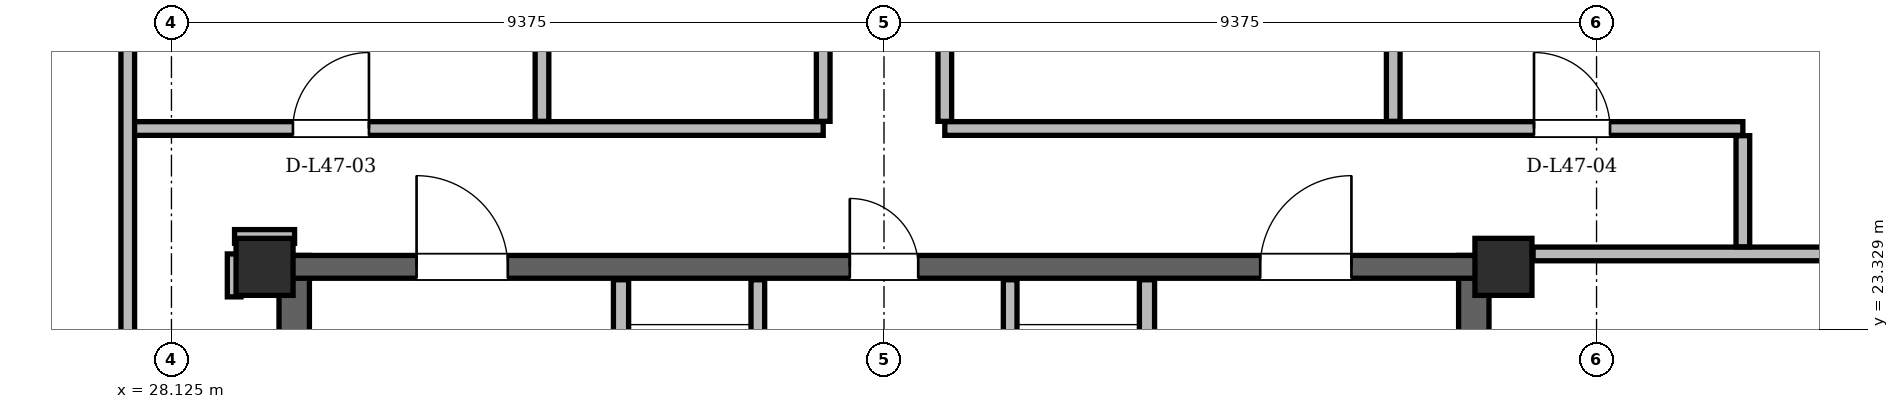
"""IFC4 building model, lengths in metres.
Left out: names, types, materials, properties, quantities, classifications, styles, units other than length and angle.
Written with IfcOpenShell. Run it as: python <this file> out.ifc"""

import sys

from ifc_helpers import new_model, si_unit, direction, frame, frame_2d, origin, origin_2d, place, context, subcontext, project, spatial, rectangle, hollow_rectangle, extrude, element, fill, save


model = new_model("IFC4")
c1 = context("Model", 3, precision=1e-05, world=origin(), true_north=direction((0.0, 1.0)))
c2 = subcontext(c1, "Body", "Model", "MODEL_VIEW")
j1 = project(units=[si_unit("LENGTHUNIT", "METRE"), si_unit("PLANEANGLEUNIT", "RADIAN")], contexts=[c1])
p1 = place(None, origin())
s1 = spatial("IfcSite", under=j1, at=p1, CompositionType="ELEMENT")
p2 = place(p1, origin())
s2 = spatial("IfcBuilding", under=s1, at=p2, CompositionType="ELEMENT")
p3 = place(p2, frame((0.0, 0.0, 178.2)))
s3 = spatial("IfcBuildingStorey", under=s2, at=p3, CompositionType="ELEMENT", Elevation=178.2)
for number, where, z_axis, x_axis in (
    (1, (45.65, 24.15, 0.0), (0.0, 0.0, 1.0), (1.0, 0.0, 0.0)),
    (2, (29.35, 24.15, 0.0), (0.0, 0.0, 1.0), (1.0, 0.0, 0.0)),
):
    element("IfcColumn", number, at=place(p3, frame(where, z_axis=z_axis, x_axis=x_axis)), inside=s3, PredefinedType="COLUMN", context=c2, shape_type="SweptSolid", body=[
        extrude(hollow_rectangle(XDim=0.75, YDim=0.75, WallThickness=0.06, at=origin_2d()), origin(), (0.0, 0.0, 1.0), 3.6),
    ])
for number, where, z_axis, x_axis in (
    (3, (29.74, 11.0, 0.0), (0.0, 0.0, 1.0), (0.0, 1.0, 0.0)),
    (4, (45.26, 11.0, 0.0), (0.0, 0.0, 1.0), (0.0, 1.0, 0.0)),
):
    element("IfcWall", number, at=place(p3, frame(where, z_axis=z_axis, x_axis=x_axis)), inside=s3, PredefinedType="SHEAR", context=c2, shape_type="SweptSolid", body=[
        extrude(rectangle(XDim=13.3, YDim=0.4, at=frame_2d((6.65, 0.0))), origin(), (0.0, 0.0, 1.0), 3.38),
    ])
p4 = place(p3, frame((29.65, 24.15, 0.0), z_axis=(0.0, 0.0, 1.0), x_axis=(1.0, 0.0, 0.0)))
e5 = element("IfcWall", 5, at=p4, inside=s3, PredefinedType="SHEAR", context=c2, shape_type="SweptSolid", body=[
    extrude(rectangle(XDim=15.7, YDim=0.3, at=frame_2d((7.85, 0.0))), origin(), (0.0, 0.0, 1.0), 3.38),
])
p5 = place(p4, frame((1.7, 0.0, 0.0)))
e6 = element("IfcOpeningElement", 6, at=p5, cuts=e5, PredefinedType="OPENING", context=c2, shape_type="SweptSolid", body=[
    extrude(rectangle(XDim=1.2, YDim=2.2, at=frame_2d((0.6, 1.1))), frame((0.0, 0.15, 0.0), z_axis=(0.0, -1.0, 0.0), x_axis=(1.0, 0.0, 0.0)), (0.0, 0.0, 1.0), 0.3),
])
p6 = place(p4, frame((12.8, 0.0, 0.0)))
e7 = element("IfcOpeningElement", 7, at=p6, cuts=e5, PredefinedType="OPENING", context=c2, shape_type="SweptSolid", body=[
    extrude(rectangle(XDim=1.2, YDim=2.2, at=frame_2d((0.6, 1.1))), frame((0.0, 0.15, 0.0), z_axis=(0.0, -1.0, 0.0), x_axis=(1.0, 0.0, 0.0)), (0.0, 0.0, 1.0), 0.3),
])
p7 = place(p4, frame((7.4, 0.0, 0.0)))
e8 = element("IfcOpeningElement", 8, at=p7, cuts=e5, PredefinedType="OPENING", context=c2, shape_type="SweptSolid", body=[
    extrude(rectangle(XDim=0.9, YDim=2.05, at=frame_2d((0.45, 1.025))), frame((0.0, 0.15, 0.0), z_axis=(0.0, -1.0, 0.0), x_axis=(1.0, 0.0, 0.0)), (0.0, 0.0, 1.0), 0.3),
])
p8 = place(p3, frame((59.612, 12.087, 0.0), z_axis=(0.0, 0.0, 1.0), x_axis=(-0.499997641637, 0.866026765382, 0.0)))
e9 = element("IfcWall", 9, at=p8, inside=s3, PredefinedType="SOLIDWALL", context=c2, shape_type="SweptSolid", body=[
    extrude(rectangle(XDim=35.992, YDim=0.29, at=frame_2d((17.996, 0.0))), origin(), (0.0, 0.0, 1.0), 2.6),
])
p9 = place(p8, frame((8.034, 0.0, 0.0)))
e10 = element("IfcOpeningElement", 10, at=p9, cuts=e9, PredefinedType="OPENING", context=c2, shape_type="SweptSolid", body=[
    extrude(rectangle(XDim=1.5, YDim=2.2, at=frame_2d((0.75, 1.1))), frame((0.0, 0.145, 0.0), z_axis=(0.0, -1.0, 0.0), x_axis=(1.0, 0.0, 0.0)), (0.0, 0.0, 1.0), 0.29),
])
p10 = place(p8, frame((31.062, 0.0, 0.0)))
e11 = element("IfcOpeningElement", 11, at=p10, cuts=e9, PredefinedType="OPENING", context=c2, shape_type="SweptSolid", body=[
    extrude(rectangle(XDim=1.5, YDim=2.2, at=frame_2d((0.75, 1.1))), frame((0.0, 0.145, 0.0), z_axis=(0.0, -1.0, 0.0), x_axis=(1.0, 0.0, 0.0)), (0.0, 0.0, 1.0), 0.29),
])
p11 = place(p8, frame((28.16, 0.0, 0.85)))
e12 = element("IfcOpeningElement", 12, at=p11, cuts=e9, PredefinedType="OPENING", context=c2, shape_type="SweptSolid", body=[
    extrude(rectangle(XDim=1.2, YDim=1.48, at=frame_2d((0.6, 0.74))), frame((0.0, 0.145, 0.0), z_axis=(0.0, -1.0, 0.0), x_axis=(1.0, 0.0, 0.0)), (0.0, 0.0, 1.0), 0.29),
])
p12 = place(p8, frame((33.069, 0.0, 0.85)))
e13 = element("IfcOpeningElement", 13, at=p12, cuts=e9, PredefinedType="OPENING", context=c2, shape_type="SweptSolid", body=[
    extrude(rectangle(XDim=1.2, YDim=1.48, at=frame_2d((0.6, 0.74))), frame((0.0, 0.145, 0.0), z_axis=(0.0, -1.0, 0.0), x_axis=(1.0, 0.0, 0.0)), (0.0, 0.0, 1.0), 0.29),
])
p13 = place(p8, frame((14.916, 0.0, 0.85)))
e14 = element("IfcOpeningElement", 14, at=p13, cuts=e9, PredefinedType="OPENING", context=c2, shape_type="SweptSolid", body=[
    extrude(rectangle(XDim=1.4, YDim=1.6, at=frame_2d((0.7, 0.8))), frame((0.0, 0.145, 0.0), z_axis=(0.0, -1.0, 0.0), x_axis=(1.0, 0.0, 0.0)), (0.0, 0.0, 1.0), 0.29),
])
p14 = place(p8, frame((17.971, 0.0, 0.85)))
e15 = element("IfcOpeningElement", 15, at=p14, cuts=e9, PredefinedType="OPENING", context=c2, shape_type="SweptSolid", body=[
    extrude(rectangle(XDim=1.2, YDim=1.48, at=frame_2d((0.6, 0.74))), frame((0.0, 0.145, 0.0), z_axis=(0.0, -1.0, 0.0), x_axis=(1.0, 0.0, 0.0)), (0.0, 0.0, 1.0), 0.29),
])
p15 = place(p8, frame((21.213, 0.0, 0.85)))
e16 = element("IfcOpeningElement", 16, at=p15, cuts=e9, PredefinedType="OPENING", context=c2, shape_type="SweptSolid", body=[
    extrude(rectangle(XDim=1.2, YDim=1.48, at=frame_2d((0.6, 0.74))), frame((0.0, 0.145, 0.0), z_axis=(0.0, -1.0, 0.0), x_axis=(1.0, 0.0, 0.0)), (0.0, 0.0, 1.0), 0.29),
])
p16 = place(p8, frame((26.453, 0.0, 0.85)))
e17 = element("IfcOpeningElement", 17, at=p16, cuts=e9, PredefinedType="OPENING", context=c2, shape_type="SweptSolid", body=[
    extrude(rectangle(XDim=1.2, YDim=1.48, at=frame_2d((0.6, 0.74))), frame((0.0, 0.145, 0.0), z_axis=(0.0, -1.0, 0.0), x_axis=(1.0, 0.0, 0.0)), (0.0, 0.0, 1.0), 0.29),
])
p17 = place(p3, frame((33.384, 43.257, 0.0), z_axis=(0.0, 0.0, 1.0), x_axis=(-0.499997641637, -0.866026765382, 0.0)))
e18 = element("IfcWall", 18, at=p17, inside=s3, PredefinedType="SOLIDWALL", context=c2, shape_type="SweptSolid", body=[
    extrude(rectangle(XDim=35.992, YDim=0.29, at=frame_2d((17.996, 0.0))), origin(), (0.0, 0.0, 1.0), 2.6),
])
p18 = place(p17, frame((8.034, 0.0, 0.0)))
e19 = element("IfcOpeningElement", 19, at=p18, cuts=e18, PredefinedType="OPENING", context=c2, shape_type="SweptSolid", body=[
    extrude(rectangle(XDim=1.5, YDim=2.2, at=frame_2d((0.75, 1.1))), frame((0.0, 0.145, 0.0), z_axis=(0.0, -1.0, 0.0), x_axis=(1.0, 0.0, 0.0)), (0.0, 0.0, 1.0), 0.29),
])
p19 = place(p17, frame((27.913, 0.0, 0.0)))
e20 = element("IfcOpeningElement", 20, at=p19, cuts=e18, PredefinedType="OPENING", context=c2, shape_type="SweptSolid", body=[
    extrude(rectangle(XDim=1.5, YDim=2.2, at=frame_2d((0.75, 1.1))), frame((0.0, 0.145, 0.0), z_axis=(0.0, -1.0, 0.0), x_axis=(1.0, 0.0, 0.0)), (0.0, 0.0, 1.0), 0.29),
])
p20 = place(p17, frame((33.875, 0.0, 0.85)))
e21 = element("IfcOpeningElement", 21, at=p20, cuts=e18, PredefinedType="OPENING", context=c2, shape_type="SweptSolid", body=[
    extrude(rectangle(XDim=1.2, YDim=1.48, at=frame_2d((0.6, 0.74))), frame((0.0, 0.145, 0.0), z_axis=(0.0, -1.0, 0.0), x_axis=(1.0, 0.0, 0.0)), (0.0, 0.0, 1.0), 0.29),
])
p21 = place(p17, frame((18.191, 0.0, 0.85)))
e22 = element("IfcOpeningElement", 22, at=p21, cuts=e18, PredefinedType="OPENING", context=c2, shape_type="SweptSolid", body=[
    extrude(rectangle(XDim=2.6, YDim=1.64, at=frame_2d((1.3, 0.82))), frame((0.0, 0.145, 0.0), z_axis=(0.0, -1.0, 0.0), x_axis=(1.0, 0.0, 0.0)), (0.0, 0.0, 1.0), 0.29),
])
p22 = place(p17, frame((26.178, 0.0, 0.85)))
e23 = element("IfcOpeningElement", 23, at=p22, cuts=e18, PredefinedType="OPENING", context=c2, shape_type="SweptSolid", body=[
    extrude(rectangle(XDim=1.2, YDim=1.48, at=frame_2d((0.6, 0.74))), frame((0.0, 0.145, 0.0), z_axis=(0.0, -1.0, 0.0), x_axis=(1.0, 0.0, 0.0)), (0.0, 0.0, 1.0), 0.29),
])
p23 = place(p17, frame((12.657, 0.0, 0.85)))
e24 = element("IfcOpeningElement", 24, at=p23, cuts=e18, PredefinedType="OPENING", context=c2, shape_type="SweptSolid", body=[
    extrude(rectangle(XDim=1.2, YDim=1.48, at=frame_2d((0.6, 0.74))), frame((0.0, 0.145, 0.0), z_axis=(0.0, -1.0, 0.0), x_axis=(1.0, 0.0, 0.0)), (0.0, 0.0, 1.0), 0.29),
])
p24 = place(p17, frame((14.939, 0.0, 0.85)))
e25 = element("IfcOpeningElement", 25, at=p24, cuts=e18, PredefinedType="OPENING", context=c2, shape_type="SweptSolid", body=[
    extrude(rectangle(XDim=1.8, YDim=1.64, at=frame_2d((0.9, 0.82))), frame((0.0, 0.145, 0.0), z_axis=(0.0, -1.0, 0.0), x_axis=(1.0, 0.0, 0.0)), (0.0, 0.0, 1.0), 0.29),
])
p25 = place(p17, frame((2.236, 0.0, 0.85)))
e26 = element("IfcOpeningElement", 26, at=p25, cuts=e18, PredefinedType="OPENING", context=c2, shape_type="SweptSolid", body=[
    extrude(rectangle(XDim=2.0, YDim=1.64, at=frame_2d((1.0, 0.82))), frame((0.0, 0.145, 0.0), z_axis=(0.0, -1.0, 0.0), x_axis=(1.0, 0.0, 0.0)), (0.0, 0.0, 1.0), 0.29),
])
p26 = place(p3, frame((34.04, 19.48, 0.0), z_axis=(0.0, 0.0, 1.0), x_axis=(0.0, 1.0, 0.0)))
e27 = element("IfcWall", 27, at=p26, inside=s3, PredefinedType="PARTITIONING", context=c2, shape_type="SweptSolid", body=[
    extrude(rectangle(XDim=4.5, YDim=0.2, at=frame_2d((2.25, 0.0))), origin(), (0.0, 0.0, 1.0), 3.38),
])
p27 = place(p26, frame((2.12, 0.0, 0.0)))
e28 = element("IfcOpeningElement", 28, at=p27, cuts=e27, PredefinedType="OPENING", context=c2, shape_type="SweptSolid", body=[
    extrude(rectangle(XDim=1.1, YDim=2.2, at=frame_2d((0.55, 1.1))), frame((0.0, 0.1, 0.0), z_axis=(0.0, -1.0, 0.0), x_axis=(1.0, 0.0, 0.0)), (0.0, 0.0, 1.0), 0.2),
])
p28 = place(p3, frame((35.84, 20.96, 0.0), z_axis=(0.0, 0.0, 1.0), x_axis=(0.0, 1.0, 0.0)))
e29 = element("IfcWall", 29, at=p28, inside=s3, PredefinedType="PARTITIONING", context=c2, shape_type="SweptSolid", body=[
    extrude(rectangle(XDim=3.02, YDim=0.18, at=frame_2d((1.51, 0.0))), origin(), (0.0, 0.0, 1.0), 3.38),
])
p29 = place(p3, frame((40.96, 19.48, 0.0), z_axis=(0.0, 0.0, 1.0), x_axis=(0.0, 1.0, 0.0)))
e30 = element("IfcWall", 30, at=p29, inside=s3, PredefinedType="PARTITIONING", context=c2, shape_type="SweptSolid", body=[
    extrude(rectangle(XDim=4.5, YDim=0.2, at=frame_2d((2.25, 0.0))), origin(), (0.0, 0.0, 1.0), 3.38),
])
p30 = place(p29, frame((2.12, 0.0, 0.0)))
e31 = element("IfcOpeningElement", 31, at=p30, cuts=e30, PredefinedType="OPENING", context=c2, shape_type="SweptSolid", body=[
    extrude(rectangle(XDim=1.1, YDim=2.2, at=frame_2d((0.55, 1.1))), frame((0.0, 0.1, 0.0), z_axis=(0.0, -1.0, 0.0), x_axis=(1.0, 0.0, 0.0)), (0.0, 0.0, 1.0), 0.2),
])
p31 = place(p3, frame((39.16, 20.96, 0.0), z_axis=(0.0, 0.0, 1.0), x_axis=(0.0, 1.0, 0.0)))
e32 = element("IfcWall", 32, at=p31, inside=s3, PredefinedType="PARTITIONING", context=c2, shape_type="SweptSolid", body=[
    extrude(rectangle(XDim=3.02, YDim=0.18, at=frame_2d((1.51, 0.0))), origin(), (0.0, 0.0, 1.0), 3.38),
])
p32 = place(p3, frame((46.04, 24.32, 0.0), z_axis=(0.0, 0.0, 1.0), x_axis=(1.0, 0.0, 0.0)))
e33 = element("IfcWall", 33, at=p32, inside=s3, PredefinedType="PARTITIONING", context=c2, shape_type="SweptSolid", body=[
    extrude(rectangle(XDim=6.337, YDim=0.18, at=frame_2d((3.169, 0.0))), origin(), (0.0, 0.0, 1.0), 3.38),
])
p33 = place(p3, frame((28.955, 24.55, 0.0), z_axis=(0.0, 0.0, 1.0), x_axis=(1.0, 0.0, 0.0)))
e34 = element("IfcWall", 34, at=p33, inside=s3, PredefinedType="PARTITIONING", context=c2, shape_type="SweptSolid", body=[
    extrude(rectangle(XDim=0.79, YDim=0.18, at=frame_2d((0.395, 0.0))), origin(), (0.0, 0.0, 1.0), 2.842),
])
p34 = place(p3, frame((27.55, 25.97, 0.0), z_axis=(0.0, 0.0, 1.0), x_axis=(1.0, 0.0, 0.0)))
e35 = element("IfcWall", 35, at=p34, inside=s3, PredefinedType="PARTITIONING", context=c2, shape_type="SweptSolid", body=[
    extrude(rectangle(XDim=9.15, YDim=0.18, at=frame_2d((4.575, 0.0))), origin(), (0.0, 0.0, 1.0), 2.842),
])
p35 = place(p34, frame((2.173, 0.0, 0.0)))
e36 = element("IfcOpeningElement", 36, at=p35, cuts=e35, PredefinedType="OPENING", context=c2, shape_type="SweptSolid", body=[
    extrude(rectangle(XDim=1.0, YDim=2.18, at=frame_2d((0.5, 1.09))), frame((0.0, 0.09, 0.0), z_axis=(0.0, -1.0, 0.0), x_axis=(1.0, 0.0, 0.0)), (0.0, 0.0, 1.0), 0.18),
])
p36 = place(p3, frame((38.3, 25.97, 0.0), z_axis=(0.0, 0.0, 1.0), x_axis=(1.0, 0.0, 0.0)))
e37 = element("IfcWall", 37, at=p36, inside=s3, PredefinedType="PARTITIONING", context=c2, shape_type="SweptSolid", body=[
    extrude(rectangle(XDim=10.5, YDim=0.18, at=frame_2d((5.25, 0.0))), origin(), (0.0, 0.0, 1.0), 2.842),
])
p37 = place(p36, frame((7.752, 0.0, 0.0)))
e38 = element("IfcOpeningElement", 38, at=p37, cuts=e37, PredefinedType="OPENING", context=c2, shape_type="SweptSolid", body=[
    extrude(rectangle(XDim=1.0, YDim=2.18, at=frame_2d((0.5, 1.09))), frame((0.0, 0.09, 0.0), z_axis=(0.0, -1.0, 0.0), x_axis=(1.0, 0.0, 0.0)), (0.0, 0.0, 1.0), 0.18),
])
p38 = place(p3, frame((27.55, 18.544, 0.0), z_axis=(0.0, 0.0, 1.0), x_axis=(0.0, 1.0, 0.0)))
e39 = element("IfcWall", 39, at=p38, inside=s3, PredefinedType="PARTITIONING", context=c2, shape_type="SweptSolid", body=[
    extrude(rectangle(XDim=14.311, YDim=0.18, at=frame_2d((7.155, 0.0))), origin(), (0.0, 0.0, 1.0), 3.38),
])
p39 = place(p38, frame((2.267, 0.0, 0.0)))
e40 = element("IfcOpeningElement", 40, at=p39, cuts=e39, PredefinedType="OPENING", context=c2, shape_type="SweptSolid", body=[
    extrude(rectangle(XDim=1.0, YDim=2.18, at=frame_2d((0.5, 1.09))), frame((0.0, 0.09, 0.0), z_axis=(0.0, -1.0, 0.0), x_axis=(1.0, 0.0, 0.0)), (0.0, 0.0, 1.0), 0.18),
])
p40 = place(p3, frame((28.95, 23.755, 0.0), z_axis=(0.0, 0.0, 1.0), x_axis=(0.0, 1.0, 0.0)))
e41 = element("IfcWall", 41, at=p40, inside=s3, PredefinedType="PARTITIONING", context=c2, shape_type="SweptSolid", body=[
    extrude(rectangle(XDim=0.565, YDim=0.18, at=frame_2d((0.283, 0.0))), origin(), (0.0, 0.0, 1.0), 3.38),
])
p41 = place(p3, frame((33.0, 26.064, 0.0), z_axis=(0.0, 0.0, 1.0), x_axis=(0.0, 1.0, 0.0)))
e42 = element("IfcWall", 42, at=p41, inside=s3, PredefinedType="PARTITIONING", context=c2, shape_type="SweptSolid", body=[
    extrude(rectangle(XDim=16.23, YDim=0.18, at=frame_2d((8.115, 0.0))), origin(), (0.0, 0.0, 1.0), 2.842),
])
p42 = place(p3, frame((36.7, 26.064, 0.0), z_axis=(0.0, 0.0, 1.0), x_axis=(0.0, 1.0, 0.0)))
e43 = element("IfcWall", 43, at=p42, inside=s3, PredefinedType="PARTITIONING", context=c2, shape_type="SweptSolid", body=[
    extrude(rectangle(XDim=17.044, YDim=0.18, at=frame_2d((8.522, 0.0))), origin(), (0.0, 0.0, 1.0), 3.38),
])
p43 = place(p42, frame((4.899, 0.0, 0.0)))
e44 = element("IfcOpeningElement", 44, at=p43, cuts=e43, PredefinedType="OPENING", context=c2, shape_type="SweptSolid", body=[
    extrude(rectangle(XDim=1.0, YDim=2.18, at=frame_2d((0.5, 1.09))), frame((0.0, 0.09, 0.0), z_axis=(0.0, -1.0, 0.0), x_axis=(1.0, 0.0, 0.0)), (0.0, 0.0, 1.0), 0.18),
])
p44 = place(p3, frame((38.3, 26.064, 0.0), z_axis=(0.0, 0.0, 1.0), x_axis=(0.0, 1.0, 0.0)))
e45 = element("IfcWall", 45, at=p44, inside=s3, PredefinedType="PARTITIONING", context=c2, shape_type="SweptSolid", body=[
    extrude(rectangle(XDim=6.042, YDim=0.18, at=frame_2d((3.021, 0.0))), origin(), (0.0, 0.0, 1.0), 3.38),
])
p45 = place(p44, frame((4.317, 0.0, 0.0)))
e46 = element("IfcOpeningElement", 46, at=p45, cuts=e45, PredefinedType="OPENING", context=c2, shape_type="SweptSolid", body=[
    extrude(rectangle(XDim=1.0, YDim=2.18, at=frame_2d((0.5, 1.09))), frame((0.0, 0.09, 0.0), z_axis=(0.0, -1.0, 0.0), x_axis=(1.0, 0.0, 0.0)), (0.0, 0.0, 1.0), 0.18),
])
p46 = place(p3, frame((44.2, 26.064, 0.0), z_axis=(0.0, 0.0, 1.0), x_axis=(0.0, 1.0, 0.0)))
e47 = element("IfcWall", 47, at=p46, inside=s3, PredefinedType="PARTITIONING", context=c2, shape_type="SweptSolid", body=[
    extrude(rectangle(XDim=12.42, YDim=0.18, at=frame_2d((6.21, 0.0))), origin(), (0.0, 0.0, 1.0), 2.842),
])
p47 = place(p3, frame((48.8, 24.414, 0.0), z_axis=(0.0, 0.0, 1.0), x_axis=(0.0, 1.0, 0.0)))
e48 = element("IfcWall", 48, at=p47, inside=s3, PredefinedType="PARTITIONING", context=c2, shape_type="SweptSolid", body=[
    extrude(rectangle(XDim=1.462, YDim=0.18, at=frame_2d((0.731, 0.0))), origin(), (0.0, 0.0, 1.0), 3.38),
])
p48 = place(p5, origin())
e49 = element("IfcDoor", 49, at=p48, inside=s3, OperationType="SINGLE_SWING_LEFT", PredefinedType="DOOR", context=c2, shape_type="SweptSolid", body=[
    extrude(rectangle(XDim=1.2, YDim=2.2, at=frame_2d((0.6, 1.1))), frame((0.0, 0.025, 0.0), z_axis=(0.0, -1.0, 0.0), x_axis=(1.0, 0.0, 0.0)), (0.0, 0.0, 1.0), 0.05),
])
fill(e6, e49)
p49 = place(p6, origin())
e50 = element("IfcDoor", 50, at=p49, inside=s3, OperationType="SINGLE_SWING_RIGHT", PredefinedType="DOOR", context=c2, shape_type="SweptSolid", body=[
    extrude(rectangle(XDim=1.2, YDim=2.2, at=frame_2d((0.6, 1.1))), frame((0.0, 0.025, 0.0), z_axis=(0.0, -1.0, 0.0), x_axis=(1.0, 0.0, 0.0)), (0.0, 0.0, 1.0), 0.05),
])
fill(e7, e50)
p50 = place(p7, origin())
e51 = element("IfcDoor", 51, at=p50, inside=s3, OperationType="SINGLE_SWING_LEFT", PredefinedType="DOOR", context=c2, shape_type="SweptSolid", body=[
    extrude(rectangle(XDim=0.9, YDim=2.05, at=frame_2d((0.45, 1.025))), frame((0.0, 0.025, 0.0), z_axis=(0.0, -1.0, 0.0), x_axis=(1.0, 0.0, 0.0)), (0.0, 0.0, 1.0), 0.05),
])
fill(e8, e51)
p51 = place(p35, origin())
e52 = element("IfcDoor", 52, at=p51, inside=s3, OperationType="SINGLE_SWING_RIGHT", PredefinedType="DOOR", context=c2, shape_type="SweptSolid", body=[
    extrude(rectangle(XDim=1.0, YDim=2.18, at=frame_2d((0.5, 1.09))), frame((0.0, 0.025, 0.0), z_axis=(0.0, -1.0, 0.0), x_axis=(1.0, 0.0, 0.0)), (0.0, 0.0, 1.0), 0.05),
])
fill(e36, e52)
p52 = place(p37, origin())
e53 = element("IfcDoor", 53, at=p52, inside=s3, OperationType="SINGLE_SWING_LEFT", PredefinedType="DOOR", context=c2, shape_type="SweptSolid", body=[
    extrude(rectangle(XDim=1.0, YDim=2.18, at=frame_2d((0.5, 1.09))), frame((0.0, 0.025, 0.0), z_axis=(0.0, -1.0, 0.0), x_axis=(1.0, 0.0, 0.0)), (0.0, 0.0, 1.0), 0.05),
])
fill(e38, e53)
save(model, sys.argv[1])
